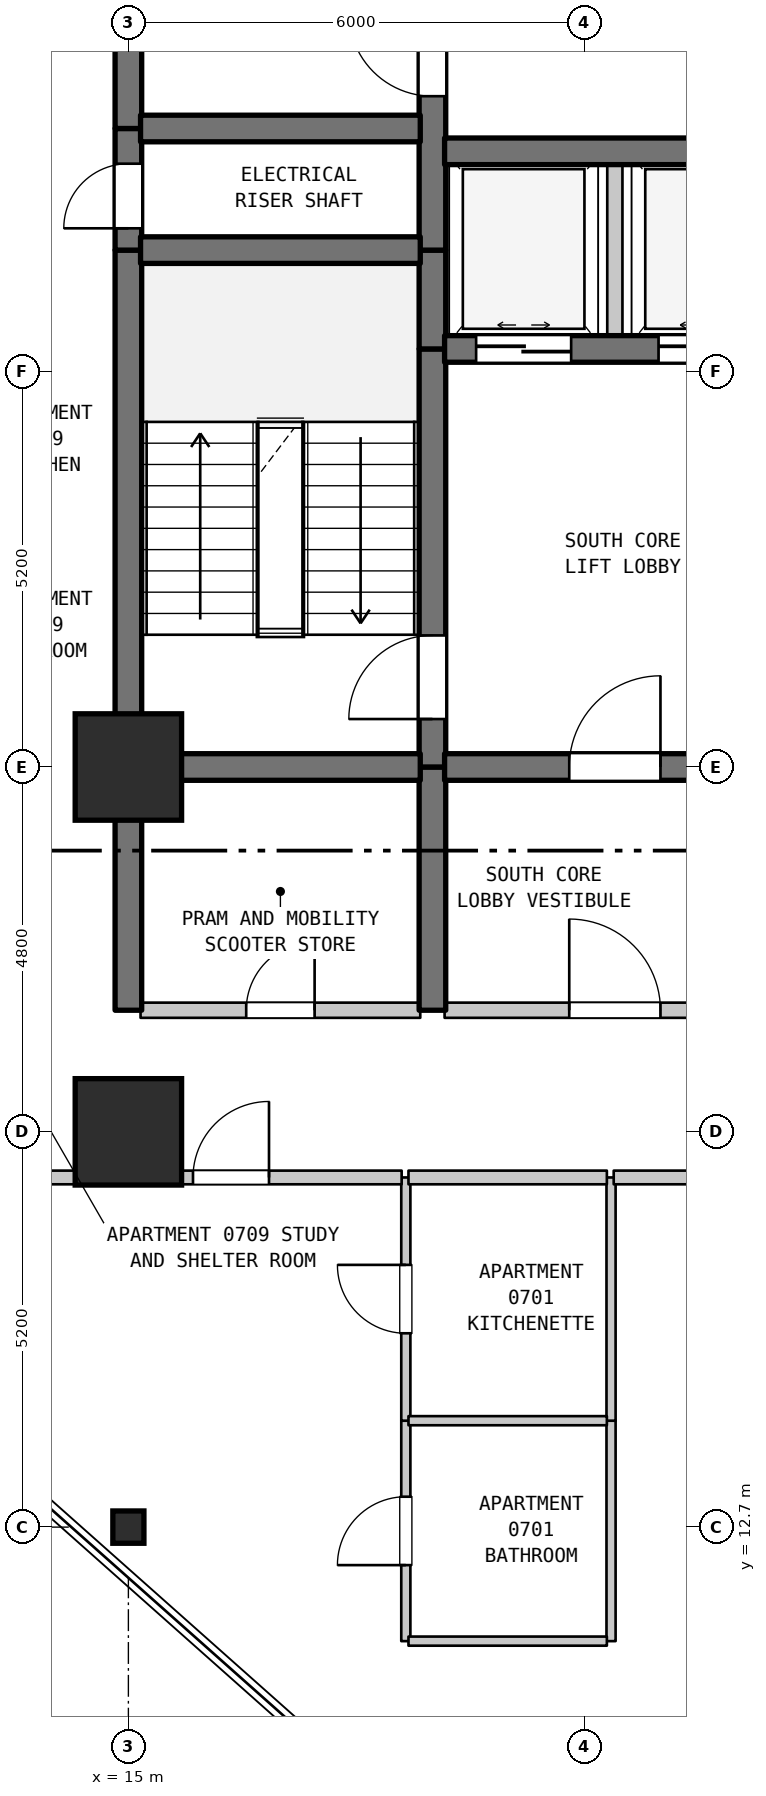
"""IFC4 building model, lengths in metres.
Left out: names, types, materials, properties, quantities, classifications, styles, units other than length and angle.
Written with IfcOpenShell. Run it as: python <this file> out.ifc"""

import sys

from ifc_helpers import new_model, si_unit, direction, frame, frame_2d, origin, origin_2d, place, context, subcontext, project, spatial, rectangle, i_section, extrude, element, fill, save


model = new_model("IFC4")
c1 = context("Model", 3, precision=1e-05, world=origin(), true_north=direction((0.0, 1.0)))
c2 = subcontext(c1, "Body", "Model", "MODEL_VIEW")
j1 = project(units=[si_unit("LENGTHUNIT", "METRE"), si_unit("PLANEANGLEUNIT", "RADIAN")], contexts=[c1])
p1 = place(None, origin())
s1 = spatial("IfcSite", under=j1, at=p1, CompositionType="ELEMENT")
p2 = place(p1, origin())
s2 = spatial("IfcBuilding", under=s1, at=p2, CompositionType="ELEMENT")
p3 = place(p2, frame((0.0, 0.0, 35.1)))
s3 = spatial("IfcBuildingStorey", under=s2, at=p3, CompositionType="ELEMENT", Elevation=35.1)
p4 = place(p3, frame((15.0, 12.7, 0.0), z_axis=(0.0, 0.0, 1.0), x_axis=(1.0, 0.0, 0.0)))
e1 = element("IfcColumn", 1, at=p4, inside=s3, PredefinedType="COLUMN", context=c2, shape_type="SweptSolid", body=[
    extrude(i_section(OverallWidth=0.409, OverallDepth=0.425, WebThickness=0.032, FlangeThickness=0.052, FilletRadius=0.015, at=origin_2d()), origin(), (0.0, 0.0, 1.0), 3.7),
])
for number, where, z_axis, x_axis in (
    (2, (15.0, 17.9, 0.0), (0.0, 0.0, 1.0), (1.0, 0.0, 0.0)),
    (3, (15.0, 22.7, 0.0), (0.0, 0.0, 1.0), (1.0, 0.0, 0.0)),
):
    element("IfcColumn", number, at=place(p3, frame(where, z_axis=z_axis, x_axis=x_axis)), inside=s3, PredefinedType="COLUMN", context=c2, shape_type="SweptSolid", body=[
        extrude(rectangle(XDim=1.4, YDim=1.4, at=origin_2d()), origin(), (0.0, 0.0, 1.0), 3.7),
    ])
p5 = place(p3, frame((15.0, 19.5, 0.0), z_axis=(0.0, 0.0, 1.0), x_axis=(0.0, 1.0, 0.0)))
e4 = element("IfcWall", 4, at=p5, inside=s3, PredefinedType="SHEAR", context=c2, shape_type="SweptSolid", body=[
    extrude(rectangle(XDim=3.2, YDim=0.35, at=frame_2d((1.6, 0.0))), origin(), (0.0, 0.0, 1.0), 3.385),
])
p6 = place(p3, frame((15.0, 22.7, 0.0), z_axis=(0.0, 0.0, 1.0), x_axis=(0.0, 1.0, 0.0)))
e5 = element("IfcWall", 5, at=p6, inside=s3, PredefinedType="SHEAR", context=c2, shape_type="SweptSolid", body=[
    extrude(rectangle(XDim=6.8, YDim=0.35, at=frame_2d((3.4, 0.0))), origin(), (0.0, 0.0, 1.0), 3.385),
])
p7 = place(p3, frame((15.0, 29.5, 0.0), z_axis=(0.0, 0.0, 1.0), x_axis=(0.0, 1.0, 0.0)))
e6 = element("IfcWall", 6, at=p7, inside=s3, PredefinedType="SHEAR", context=c2, shape_type="SweptSolid", body=[
    extrude(rectangle(XDim=1.6, YDim=0.35, at=frame_2d((0.8, 0.0))), origin(), (0.0, 0.0, 1.0), 3.385),
])
p8 = place(p7, frame((0.287, 0.0, 0.0)))
e7 = element("IfcOpeningElement", 7, at=p8, cuts=e6, PredefinedType="OPENING", context=c2, shape_type="SweptSolid", body=[
    extrude(rectangle(XDim=0.85, YDim=2.1, at=frame_2d((0.425, 1.05))), frame((0.0, 0.185, 0.0), z_axis=(0.0, -1.0, 0.0), x_axis=(1.0, 0.0, 0.0)), (0.0, 0.0, 1.0), 0.37),
])
p9 = place(p3, frame((15.0, 31.1, 0.0), z_axis=(0.0, 0.0, 1.0), x_axis=(0.0, 1.0, 0.0)))
e8 = element("IfcWall", 8, at=p9, inside=s3, PredefinedType="SHEAR", context=c2, shape_type="SweptSolid", body=[
    extrude(rectangle(XDim=6.8, YDim=0.35, at=frame_2d((3.4, 0.0))), origin(), (0.0, 0.0, 1.0), 3.385),
])
p10 = place(p3, frame((18.65, 11.2, 0.0), z_axis=(0.0, 0.0, 1.0), x_axis=(0.0, 1.0, 0.0)))
e9 = element("IfcWall", 9, at=p10, inside=s3, PredefinedType="PARTITIONING", context=c2, shape_type="SweptSolid", body=[
    extrude(rectangle(XDim=2.9, YDim=0.12, at=frame_2d((1.45, 0.0))), origin(), (0.0, 0.0, 1.0), 3.385),
])
p11 = place(p10, frame((1.0, 0.0, 0.0)))
e10 = element("IfcOpeningElement", 10, at=p11, cuts=e9, PredefinedType="OPENING", context=c2, shape_type="SweptSolid", body=[
    extrude(rectangle(XDim=0.9, YDim=2.1, at=frame_2d((0.45, 1.05))), frame((0.0, 0.07, 0.0), z_axis=(0.0, -1.0, 0.0), x_axis=(1.0, 0.0, 0.0)), (0.0, 0.0, 1.0), 0.14),
])
p12 = place(p3, frame((18.65, 14.1, 0.0), z_axis=(0.0, 0.0, 1.0), x_axis=(0.0, 1.0, 0.0)))
e11 = element("IfcWall", 11, at=p12, inside=s3, PredefinedType="PARTITIONING", context=c2, shape_type="SweptSolid", body=[
    extrude(rectangle(XDim=3.2, YDim=0.12, at=frame_2d((1.6, 0.0))), origin(), (0.0, 0.0, 1.0), 3.385),
])
p13 = place(p12, frame((1.15, 0.0, 0.0)))
e12 = element("IfcOpeningElement", 12, at=p13, cuts=e11, PredefinedType="OPENING", context=c2, shape_type="SweptSolid", body=[
    extrude(rectangle(XDim=0.9, YDim=2.15, at=frame_2d((0.45, 1.075))), frame((0.0, 0.07, 0.0), z_axis=(0.0, -1.0, 0.0), x_axis=(1.0, 0.0, 0.0)), (0.0, 0.0, 1.0), 0.14),
])
p14 = place(p3, frame((19.0, 19.5, 0.0), z_axis=(0.0, 0.0, 1.0), x_axis=(0.0, 1.0, 0.0)))
e13 = element("IfcWall", 13, at=p14, inside=s3, PredefinedType="SHEAR", context=c2, shape_type="SweptSolid", body=[
    extrude(rectangle(XDim=3.2, YDim=0.35, at=frame_2d((1.6, 0.0))), origin(), (0.0, 0.0, 1.0), 3.385),
])
p15 = place(p3, frame((19.0, 22.7, 0.0), z_axis=(0.0, 0.0, 1.0), x_axis=(0.0, 1.0, 0.0)))
e14 = element("IfcWall", 14, at=p15, inside=s3, PredefinedType="SHEAR", context=c2, shape_type="SweptSolid", body=[
    extrude(rectangle(XDim=5.5, YDim=0.35, at=frame_2d((2.75, 0.0))), origin(), (0.0, 0.0, 1.0), 3.385),
])
p16 = place(p15, frame((0.631, 0.0, 0.0)))
e15 = element("IfcOpeningElement", 15, at=p16, cuts=e14, PredefinedType="OPENING", context=c2, shape_type="SweptSolid", body=[
    extrude(rectangle(XDim=1.1, YDim=2.15, at=frame_2d((0.55, 1.075))), frame((0.0, 0.185, 0.0), z_axis=(0.0, -1.0, 0.0), x_axis=(1.0, 0.0, 0.0)), (0.0, 0.0, 1.0), 0.37),
])
p17 = place(p3, frame((19.0, 28.2, 0.0), z_axis=(0.0, 0.0, 1.0), x_axis=(0.0, 1.0, 0.0)))
e16 = element("IfcWall", 16, at=p17, inside=s3, PredefinedType="SHEAR", context=c2, shape_type="SweptSolid", body=[
    extrude(rectangle(XDim=1.3, YDim=0.35, at=frame_2d((0.65, 0.0))), origin(), (0.0, 0.0, 1.0), 3.385),
])
p18 = place(p3, frame((19.0, 29.5, 0.0), z_axis=(0.0, 0.0, 1.0), x_axis=(0.0, 1.0, 0.0)))
e17 = element("IfcWall", 17, at=p18, inside=s3, PredefinedType="SHEAR", context=c2, shape_type="SweptSolid", body=[
    extrude(rectangle(XDim=5.5, YDim=0.35, at=frame_2d((2.75, 0.0))), origin(), (0.0, 0.0, 1.0), 3.385),
])
p19 = place(p18, frame((2.025, 0.0, 0.0)))
e18 = element("IfcOpeningElement", 18, at=p19, cuts=e17, PredefinedType="OPENING", context=c2, shape_type="SweptSolid", body=[
    extrude(rectangle(XDim=1.1, YDim=2.15, at=frame_2d((0.55, 1.075))), frame((0.0, 0.185, 0.0), z_axis=(0.0, -1.0, 0.0), x_axis=(1.0, 0.0, 0.0)), (0.0, 0.0, 1.0), 0.37),
])
p20 = place(p3, frame((21.35, 11.2, 0.0), z_axis=(0.0, 0.0, 1.0), x_axis=(0.0, 1.0, 0.0)))
e19 = element("IfcWall", 19, at=p20, inside=s3, PredefinedType="PARTITIONING", context=c2, shape_type="SweptSolid", body=[
    extrude(rectangle(XDim=2.9, YDim=0.12, at=frame_2d((1.45, 0.0))), origin(), (0.0, 0.0, 1.0), 3.385),
])
p21 = place(p3, frame((21.35, 14.1, 0.0), z_axis=(0.0, 0.0, 1.0), x_axis=(0.0, 1.0, 0.0)))
e20 = element("IfcWall", 20, at=p21, inside=s3, PredefinedType="PARTITIONING", context=c2, shape_type="SweptSolid", body=[
    extrude(rectangle(XDim=3.2, YDim=0.12, at=frame_2d((1.6, 0.0))), origin(), (0.0, 0.0, 1.0), 3.385),
])
p22 = place(p3, frame((21.4, 28.2, 0.0), z_axis=(0.0, 0.0, 1.0), x_axis=(0.0, 1.0, 0.0)))
e21 = element("IfcWall", 21, at=p22, inside=s3, PredefinedType="STANDARD", context=c2, shape_type="SweptSolid", body=[
    extrude(rectangle(XDim=2.6, YDim=0.2, at=frame_2d((1.3, 0.0))), origin(), (0.0, 0.0, 1.0), 3.385),
])
for number, where, z_axis, x_axis in (
    (22, (18.685, 11.2, 0.0), (0.0, 0.0, 1.0), (1.0, 0.0, 0.0)),
    (23, (18.685, 14.1, 0.0), (0.0, 0.0, 1.0), (1.0, 0.0, 0.0)),
):
    element("IfcWall", number, at=place(p3, frame(where, z_axis=z_axis, x_axis=x_axis)), inside=s3, PredefinedType="PARTITIONING", context=c2, shape_type="SweptSolid", body=[
        extrude(rectangle(XDim=2.61, YDim=0.12, at=frame_2d((1.305, 0.0))), origin(), (0.0, 0.0, 1.0), 3.385),
    ])
p23 = place(p3, frame((12.875, 17.3, 0.0), z_axis=(0.0, 0.0, 1.0), x_axis=(1.0, 0.0, 0.0)))
e24 = element("IfcWall", 24, at=p23, inside=s3, PredefinedType="STANDARD", context=c2, shape_type="SweptSolid", body=[
    extrude(rectangle(XDim=5.72, YDim=0.18, at=frame_2d((2.86, 0.0))), origin(), (0.0, 0.0, 1.0), 3.385),
])
p24 = place(p23, frame((2.975, 0.0, 0.0)))
e25 = element("IfcOpeningElement", 25, at=p24, cuts=e24, PredefinedType="OPENING", context=c2, shape_type="SweptSolid", body=[
    extrude(rectangle(XDim=1.0, YDim=2.15, at=frame_2d((0.5, 1.075))), frame((0.0, 0.1, 0.0), z_axis=(0.0, -1.0, 0.0), x_axis=(1.0, 0.0, 0.0)), (0.0, 0.0, 1.0), 0.2),
])
p25 = place(p3, frame((18.685, 17.3, 0.0), z_axis=(0.0, 0.0, 1.0), x_axis=(1.0, 0.0, 0.0)))
e26 = element("IfcWall", 26, at=p25, inside=s3, PredefinedType="STANDARD", context=c2, shape_type="SweptSolid", body=[
    extrude(rectangle(XDim=2.61, YDim=0.18, at=frame_2d((1.305, 0.0))), origin(), (0.0, 0.0, 1.0), 3.385),
])
p26 = place(p3, frame((21.385, 17.3, 0.0), z_axis=(0.0, 0.0, 1.0), x_axis=(1.0, 0.0, 0.0)))
e27 = element("IfcWall", 27, at=p26, inside=s3, PredefinedType="STANDARD", context=c2, shape_type="SweptSolid", body=[
    extrude(rectangle(XDim=2.41, YDim=0.18, at=frame_2d((1.205, 0.0))), origin(), (0.0, 0.0, 1.0), 3.385),
])
p27 = place(p3, frame((15.16, 19.5, 0.0), z_axis=(0.0, 0.0, 1.0), x_axis=(1.0, 0.0, 0.0)))
e28 = element("IfcWall", 28, at=p27, inside=s3, PredefinedType="STANDARD", context=c2, shape_type="SweptSolid", body=[
    extrude(rectangle(XDim=3.68, YDim=0.2, at=frame_2d((1.84, 0.0))), origin(), (0.0, 0.0, 1.0), 3.385),
])
p28 = place(p27, frame((1.39, 0.0, 0.0)))
e29 = element("IfcOpeningElement", 29, at=p28, cuts=e28, PredefinedType="OPENING", context=c2, shape_type="SweptSolid", body=[
    extrude(rectangle(XDim=0.9, YDim=2.15, at=frame_2d((0.45, 1.075))), frame((0.0, 0.11, 0.0), z_axis=(0.0, -1.0, 0.0), x_axis=(1.0, 0.0, 0.0)), (0.0, 0.0, 1.0), 0.22),
])
p29 = place(p3, frame((19.16, 19.5, 0.0), z_axis=(0.0, 0.0, 1.0), x_axis=(1.0, 0.0, 0.0)))
e30 = element("IfcWall", 30, at=p29, inside=s3, PredefinedType="STANDARD", context=c2, shape_type="SweptSolid", body=[
    extrude(rectangle(XDim=4.48, YDim=0.2, at=frame_2d((2.24, 0.0))), origin(), (0.0, 0.0, 1.0), 3.385),
])
p30 = place(p29, frame((1.64, 0.0, 0.0)))
e31 = element("IfcOpeningElement", 31, at=p30, cuts=e30, PredefinedType="OPENING", context=c2, shape_type="SweptSolid", body=[
    extrude(rectangle(XDim=1.2, YDim=2.2, at=frame_2d((0.6, 1.1))), frame((0.0, 0.11, 0.0), z_axis=(0.0, -1.0, 0.0), x_axis=(1.0, 0.0, 0.0)), (0.0, 0.0, 1.0), 0.22),
])
p31 = place(p3, frame((15.16, 22.7, 0.0), z_axis=(0.0, 0.0, 1.0), x_axis=(1.0, 0.0, 0.0)))
e32 = element("IfcWall", 32, at=p31, inside=s3, PredefinedType="SHEAR", context=c2, shape_type="SweptSolid", body=[
    extrude(rectangle(XDim=3.68, YDim=0.35, at=frame_2d((1.84, 0.0))), origin(), (0.0, 0.0, 1.0), 3.385),
])
p32 = place(p3, frame((19.16, 22.7, 0.0), z_axis=(0.0, 0.0, 1.0), x_axis=(1.0, 0.0, 0.0)))
e33 = element("IfcWall", 33, at=p32, inside=s3, PredefinedType="SHEAR", context=c2, shape_type="SweptSolid", body=[
    extrude(rectangle(XDim=4.48, YDim=0.35, at=frame_2d((2.24, 0.0))), origin(), (0.0, 0.0, 1.0), 3.385),
])
p33 = place(p32, frame((1.64, 0.0, 0.0)))
e34 = element("IfcOpeningElement", 34, at=p33, cuts=e33, PredefinedType="OPENING", context=c2, shape_type="SweptSolid", body=[
    extrude(rectangle(XDim=1.2, YDim=2.2, at=frame_2d((0.6, 1.1))), frame((0.0, 0.185, 0.0), z_axis=(0.0, -1.0, 0.0), x_axis=(1.0, 0.0, 0.0)), (0.0, 0.0, 1.0), 0.37),
])
p34 = place(p3, frame((19.16, 28.2, 0.0), z_axis=(0.0, 0.0, 1.0), x_axis=(1.0, 0.0, 0.0)))
e35 = element("IfcWall", 35, at=p34, inside=s3, PredefinedType="SHEAR", context=c2, shape_type="SweptSolid", body=[
    extrude(rectangle(XDim=4.48, YDim=0.35, at=frame_2d((2.24, 0.0))), origin(), (0.0, 0.0, 1.0), 3.385),
])
p35 = place(p34, frame((0.415, 0.0, 0.0)))
e36 = element("IfcOpeningElement", 36, at=p35, cuts=e35, PredefinedType="OPENING", context=c2, shape_type="SweptSolid", body=[
    extrude(rectangle(XDim=1.25, YDim=2.2, at=frame_2d((0.625, 1.1))), frame((0.0, 0.185, 0.0), z_axis=(0.0, -1.0, 0.0), x_axis=(1.0, 0.0, 0.0)), (0.0, 0.0, 1.0), 0.37),
])
p36 = place(p34, frame((2.815, 0.0, 0.0)))
e37 = element("IfcOpeningElement", 37, at=p36, cuts=e35, PredefinedType="OPENING", context=c2, shape_type="SweptSolid", body=[
    extrude(rectangle(XDim=1.25, YDim=2.2, at=frame_2d((0.625, 1.1))), frame((0.0, 0.185, 0.0), z_axis=(0.0, -1.0, 0.0), x_axis=(1.0, 0.0, 0.0)), (0.0, 0.0, 1.0), 0.37),
])
p37 = place(p3, frame((15.16, 29.5, 0.0), z_axis=(0.0, 0.0, 1.0), x_axis=(1.0, 0.0, 0.0)))
e38 = element("IfcWall", 38, at=p37, inside=s3, PredefinedType="SHEAR", context=c2, shape_type="SweptSolid", body=[
    extrude(rectangle(XDim=3.68, YDim=0.35, at=frame_2d((1.84, 0.0))), origin(), (0.0, 0.0, 1.0), 3.385),
])
p38 = place(p3, frame((19.16, 30.8, 0.0), z_axis=(0.0, 0.0, 1.0), x_axis=(1.0, 0.0, 0.0)))
e39 = element("IfcWall", 39, at=p38, inside=s3, PredefinedType="SHEAR", context=c2, shape_type="SweptSolid", body=[
    extrude(rectangle(XDim=4.48, YDim=0.35, at=frame_2d((2.24, 0.0))), origin(), (0.0, 0.0, 1.0), 3.385),
])
p39 = place(p3, frame((15.16, 31.1, 0.0), z_axis=(0.0, 0.0, 1.0), x_axis=(1.0, 0.0, 0.0)))
e40 = element("IfcWall", 40, at=p39, inside=s3, PredefinedType="SHEAR", context=c2, shape_type="SweptSolid", body=[
    extrude(rectangle(XDim=3.68, YDim=0.35, at=frame_2d((1.84, 0.0))), origin(), (0.0, 0.0, 1.0), 3.385),
])
p40 = place(p8, origin())
e41 = element("IfcDoor", 41, at=p40, inside=s3, OperationType="SINGLE_SWING_LEFT", PredefinedType="DOOR", context=c2, shape_type="SweptSolid", body=[
    extrude(rectangle(XDim=0.85, YDim=2.1, at=frame_2d((0.425, 1.05))), frame((0.0, 0.025, 0.0), z_axis=(0.0, -1.0, 0.0), x_axis=(1.0, 0.0, 0.0)), (0.0, 0.0, 1.0), 0.05),
])
fill(e7, e41)
p41 = place(p11, origin())
e42 = element("IfcDoor", 42, at=p41, inside=s3, OperationType="SINGLE_SWING_LEFT", PredefinedType="DOOR", context=c2, shape_type="SweptSolid", body=[
    extrude(rectangle(XDim=0.9, YDim=2.1, at=frame_2d((0.45, 1.05))), frame((0.0, 0.025, 0.0), z_axis=(0.0, -1.0, 0.0), x_axis=(1.0, 0.0, 0.0)), (0.0, 0.0, 1.0), 0.05),
])
fill(e10, e42)
p42 = place(p13, origin())
e43 = element("IfcDoor", 43, at=p42, inside=s3, OperationType="SINGLE_SWING_RIGHT", PredefinedType="DOOR", context=c2, shape_type="SweptSolid", body=[
    extrude(rectangle(XDim=0.9, YDim=2.15, at=frame_2d((0.45, 1.075))), frame((0.0, 0.025, 0.0), z_axis=(0.0, -1.0, 0.0), x_axis=(1.0, 0.0, 0.0)), (0.0, 0.0, 1.0), 0.05),
])
fill(e12, e43)
p43 = place(p16, origin())
e44 = element("IfcDoor", 44, at=p43, inside=s3, OperationType="SINGLE_SWING_LEFT", PredefinedType="DOOR", context=c2, shape_type="SweptSolid", body=[
    extrude(rectangle(XDim=1.1, YDim=2.15, at=frame_2d((0.55, 1.075))), frame((0.0, 0.025, 0.0), z_axis=(0.0, -1.0, 0.0), x_axis=(1.0, 0.0, 0.0)), (0.0, 0.0, 1.0), 0.05),
])
fill(e15, e44)
p44 = place(p19, origin())
e45 = element("IfcDoor", 45, at=p44, inside=s3, OperationType="SINGLE_SWING_RIGHT", PredefinedType="DOOR", context=c2, shape_type="SweptSolid", body=[
    extrude(rectangle(XDim=1.1, YDim=2.15, at=frame_2d((0.55, 1.075))), frame((0.0, 0.025, 0.0), z_axis=(0.0, -1.0, 0.0), x_axis=(1.0, 0.0, 0.0)), (0.0, 0.0, 1.0), 0.05),
])
fill(e18, e45)
p45 = place(p24, origin())
e46 = element("IfcDoor", 46, at=p45, inside=s3, OperationType="SINGLE_SWING_RIGHT", PredefinedType="DOOR", context=c2, shape_type="SweptSolid", body=[
    extrude(rectangle(XDim=1.0, YDim=2.15, at=frame_2d((0.5, 1.075))), frame((0.0, 0.025, 0.0), z_axis=(0.0, -1.0, 0.0), x_axis=(1.0, 0.0, 0.0)), (0.0, 0.0, 1.0), 0.05),
])
fill(e25, e46)
p46 = place(p28, origin())
e47 = element("IfcDoor", 47, at=p46, inside=s3, OperationType="SINGLE_SWING_RIGHT", PredefinedType="DOOR", context=c2, shape_type="SweptSolid", body=[
    extrude(rectangle(XDim=0.9, YDim=2.15, at=frame_2d((0.45, 1.075))), frame((0.0, 0.025, 0.0), z_axis=(0.0, -1.0, 0.0), x_axis=(1.0, 0.0, 0.0)), (0.0, 0.0, 1.0), 0.05),
])
fill(e29, e47)
p47 = place(p30, origin())
e48 = element("IfcDoor", 48, at=p47, inside=s3, OperationType="SINGLE_SWING_LEFT", PredefinedType="DOOR", context=c2, shape_type="SweptSolid", body=[
    extrude(rectangle(XDim=1.2, YDim=2.2, at=frame_2d((0.6, 1.1))), frame((0.0, 0.025, 0.0), z_axis=(0.0, -1.0, 0.0), x_axis=(1.0, 0.0, 0.0)), (0.0, 0.0, 1.0), 0.05),
])
fill(e31, e48)
p48 = place(p33, origin())
e49 = element("IfcDoor", 49, at=p48, inside=s3, OperationType="SINGLE_SWING_RIGHT", PredefinedType="DOOR", context=c2, shape_type="SweptSolid", body=[
    extrude(rectangle(XDim=1.2, YDim=2.2, at=frame_2d((0.6, 1.1))), frame((0.0, 0.025, 0.0), z_axis=(0.0, -1.0, 0.0), x_axis=(1.0, 0.0, 0.0)), (0.0, 0.0, 1.0), 0.05),
])
fill(e34, e49)
p49 = place(p35, origin())
e50 = element("IfcDoor", 50, at=p49, inside=s3, OperationType="DOUBLE_DOOR_SLIDING", PredefinedType="DOOR", context=c2, shape_type="SweptSolid", body=[
    extrude(rectangle(XDim=1.25, YDim=2.2, at=frame_2d((0.625, 1.1))), frame((0.0, 0.025, 0.0), z_axis=(0.0, -1.0, 0.0), x_axis=(1.0, 0.0, 0.0)), (0.0, 0.0, 1.0), 0.05),
])
fill(e36, e50)
p50 = place(p36, origin())
e51 = element("IfcDoor", 51, at=p50, inside=s3, OperationType="DOUBLE_DOOR_SLIDING", PredefinedType="DOOR", context=c2, shape_type="SweptSolid", body=[
    extrude(rectangle(XDim=1.25, YDim=2.2, at=frame_2d((0.625, 1.1))), frame((0.0, 0.025, 0.0), z_axis=(0.0, -1.0, 0.0), x_axis=(1.0, 0.0, 0.0)), (0.0, 0.0, 1.0), 0.05),
])
fill(e37, e51)
save(model, sys.argv[1])
